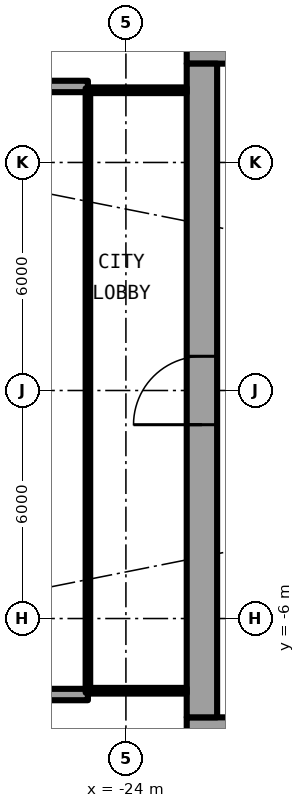
"""IFC4 building model, lengths in metres.
Left out: names, types, materials, properties, quantities, classifications, styles, units other than length and angle.
Written with IfcOpenShell. Run it as: python <this file> out.ifc"""

import sys

from ifc_helpers import new_model, si_unit, direction, frame, frame_2d, origin, place, context, subcontext, project, spatial, rectangle, extrude, element, fill, save


model = new_model("IFC4")
c1 = context("Model", 3, precision=1e-05, world=origin(), true_north=direction((0.0, 1.0)))
c2 = subcontext(c1, "Body", "Model", "MODEL_VIEW")
j1 = project(units=[si_unit("LENGTHUNIT", "METRE"), si_unit("PLANEANGLEUNIT", "RADIAN")], contexts=[c1])
p1 = place(None, origin())
s1 = spatial("IfcSite", under=j1, at=p1, CompositionType="ELEMENT")
p2 = place(p1, origin())
s2 = spatial("IfcBuilding", under=s1, at=p2, CompositionType="ELEMENT")
p3 = place(p2, frame((0.0, 0.0, 41.1)))
s3 = spatial("IfcBuildingStorey", under=s2, at=p3, CompositionType="ELEMENT", Elevation=41.1)
for number, where, z_axis, x_axis in (
    (1, (-25.0, 8.0, 0.0), (0.0, 0.0, 1.0), (-1.0, 0.0, 0.0)),
    (2, (-25.0, -8.0, 0.0), (0.0, 0.0, 1.0), (-1.0, 0.0, 0.0)),
):
    element("IfcWall", number, at=place(p3, frame(where, z_axis=z_axis, x_axis=x_axis)), inside=s3, PredefinedType="SOLIDWALL", context=c2, shape_type="SweptSolid", body=[
        extrude(rectangle(XDim=2.667, YDim=0.3, at=frame_2d((1.333, 0.0))), origin(), (0.0, 0.0, 1.0), 2.7),
    ])
p4 = place(p3, frame((-22.4, -9.0, 0.0), z_axis=(0.0, 0.0, 1.0), x_axis=(1.0, 0.0, 0.0)))
e3 = element("IfcWall", 3, at=p4, inside=s3, PredefinedType="SHEAR", context=c2, shape_type="SweptSolid", body=[
    extrude(rectangle(XDim=14.2, YDim=0.8, at=frame_2d((7.1, 0.0))), origin(), (0.0, 0.0, 1.0), 3.05),
])
p5 = place(p4, frame((1.325, 0.0, 0.0)))
e4 = element("IfcOpeningElement", 4, at=p5, cuts=e3, PredefinedType="OPENING", context=c2, shape_type="SweptSolid", body=[
    extrude(rectangle(XDim=1.2, YDim=2.3, at=frame_2d((0.6, 1.15))), frame((0.0, 0.41, 0.0), z_axis=(0.0, -1.0, 0.0), x_axis=(1.0, 0.0, 0.0)), (0.0, 0.0, 1.0), 0.82),
])
p6 = place(p3, frame((-8.2, 9.0, 0.0), z_axis=(0.0, 0.0, 1.0), x_axis=(-1.0, 0.0, 0.0)))
e5 = element("IfcWall", 5, at=p6, inside=s3, PredefinedType="SHEAR", context=c2, shape_type="SweptSolid", body=[
    extrude(rectangle(XDim=14.2, YDim=0.8, at=frame_2d((7.1, 0.0))), origin(), (0.0, 0.0, 1.0), 3.05),
])
p7 = place(p6, frame((11.675, 0.0, 0.0)))
e6 = element("IfcOpeningElement", 6, at=p7, cuts=e5, PredefinedType="OPENING", context=c2, shape_type="SweptSolid", body=[
    extrude(rectangle(XDim=1.2, YDim=2.3, at=frame_2d((0.6, 1.15))), frame((0.0, 0.41, 0.0), z_axis=(0.0, -1.0, 0.0), x_axis=(1.0, 0.0, 0.0)), (0.0, 0.0, 1.0), 0.82),
])
p8 = place(p3, frame((-22.0, -8.6, 0.0), z_axis=(0.0, 0.0, 1.0), x_axis=(0.0, 1.0, 0.0)))
e7 = element("IfcWall", 7, at=p8, inside=s3, PredefinedType="SHEAR", context=c2, shape_type="SweptSolid", body=[
    extrude(rectangle(XDim=17.2, YDim=0.8, at=frame_2d((8.6, 0.0))), origin(), (0.0, 0.0, 1.0), 3.05),
])
p9 = place(p8, frame((7.7, 0.0, 0.0)))
e8 = element("IfcOpeningElement", 8, at=p9, cuts=e7, PredefinedType="OPENING", context=c2, shape_type="SweptSolid", body=[
    extrude(rectangle(XDim=1.8, YDim=2.3, at=frame_2d((0.9, 1.15))), frame((0.0, 0.41, 0.0), z_axis=(0.0, -1.0, 0.0), x_axis=(1.0, 0.0, 0.0)), (0.0, 0.0, 1.0), 0.82),
])
for number, where, z_axis, x_axis in (
    (9, (-22.4, 7.9, 0.0), (0.0, 0.0, 1.0), (-1.0, 0.0, 0.0)),
    (10, (-22.4, -7.9, 0.0), (0.0, 0.0, 1.0), (-1.0, 0.0, 0.0)),
):
    element("IfcWall", number, at=place(p3, frame(where, z_axis=z_axis, x_axis=x_axis)), inside=s3, PredefinedType="PARTITIONING", context=c2, shape_type="SweptSolid", body=[
        extrude(rectangle(XDim=2.54, YDim=0.15, at=frame_2d((1.27, 0.0))), origin(), (0.0, 0.0, 1.0), 2.7),
    ])
p10 = place(p3, frame((-25.0, 7.95, 0.0), z_axis=(0.0, 0.0, 1.0), x_axis=(0.0, -1.0, 0.0)))
e11 = element("IfcWall", 11, at=p10, inside=s3, PredefinedType="PARTITIONING", context=c2, shape_type="SweptSolid", body=[
    extrude(rectangle(XDim=15.9, YDim=0.12, at=frame_2d((7.95, 0.0))), origin(), (0.0, 0.0, 1.0), 2.7),
])
p11 = place(p10, frame((0.95, 0.0, 0.1)))
e12 = element("IfcOpeningElement", 12, at=p11, cuts=e11, PredefinedType="OPENING", context=c2, shape_type="SweptSolid", body=[
    extrude(rectangle(XDim=14.0, YDim=2.35, at=frame_2d((7.0, 1.175))), frame((0.0, 0.07, 0.0), z_axis=(0.0, -1.0, 0.0), x_axis=(1.0, 0.0, 0.0)), (0.0, 0.0, 1.0), 0.14),
])
p12 = place(p9, origin())
e13 = element("IfcDoor", 13, at=p12, inside=s3, OperationType="SINGLE_SWING_LEFT", PredefinedType="DOOR", context=c2, shape_type="SweptSolid", body=[
    extrude(rectangle(XDim=1.8, YDim=2.3, at=frame_2d((0.9, 1.15))), frame((0.0, 0.025, 0.0), z_axis=(0.0, -1.0, 0.0), x_axis=(1.0, 0.0, 0.0)), (0.0, 0.0, 1.0), 0.05),
])
fill(e8, e13)
p13 = place(p11, origin())
e14 = element("IfcWindow", 14, at=p13, inside=s3, PartitioningType="SINGLE_PANEL", PredefinedType="WINDOW", context=c2, shape_type="SweptSolid", body=[
    extrude(rectangle(XDim=14.0, YDim=2.35, at=frame_2d((7.0, 1.175))), frame((0.0, 0.03, 0.0), z_axis=(0.0, -1.0, 0.0), x_axis=(1.0, 0.0, 0.0)), (0.0, 0.0, 1.0), 0.06),
])
fill(e12, e14)
save(model, sys.argv[1])
